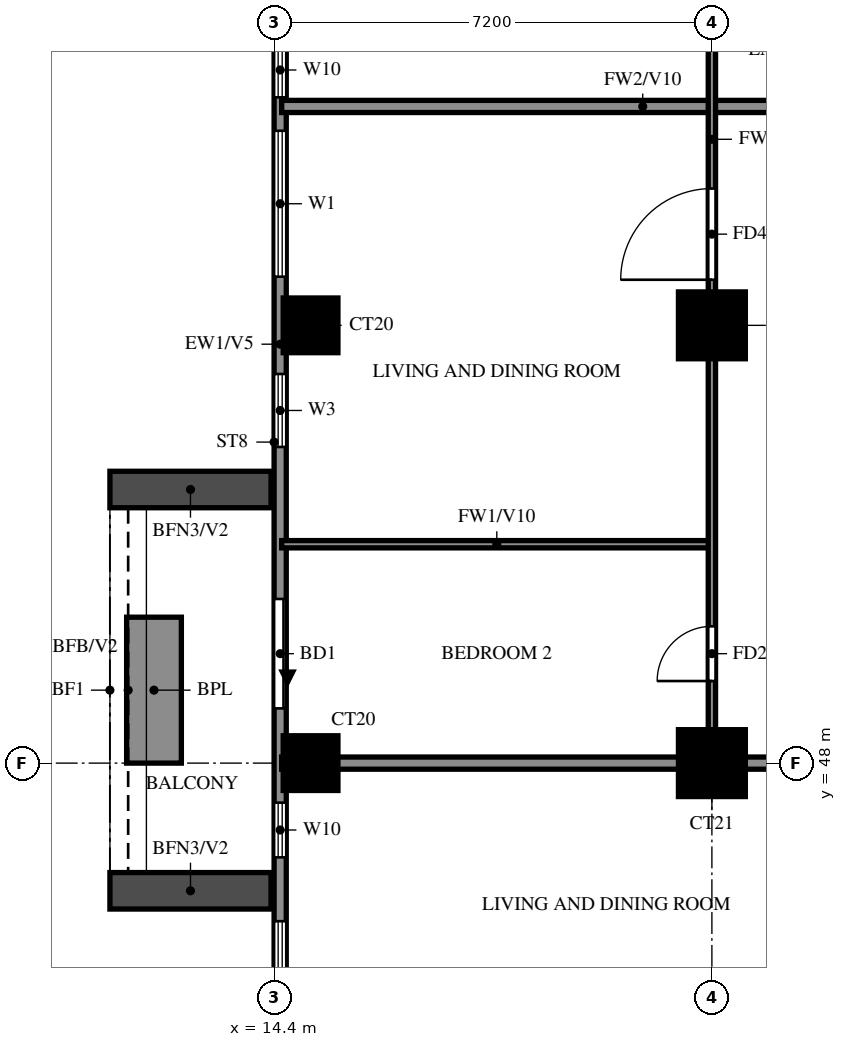
"""IFC4 building model, lengths in metres.
Left out: names, types, materials, properties, quantities, classifications, styles, units other than length and angle.
Written with IfcOpenShell. Run it as: python <this file> out.ifc"""

import sys

from ifc_helpers import new_model, si_unit, direction, frame, frame_2d, origin, origin_2d, place, context, subcontext, project, spatial, rectangle, extrude, source, transform, mapped, element, fill, save


model = new_model("IFC4")
c1 = context("Model", 3, precision=1e-05, world=origin(), true_north=direction((0.0, 1.0)))
c2 = subcontext(c1, "Body", "Model", "MODEL_VIEW")
j1 = project(units=[si_unit("LENGTHUNIT", "METRE"), si_unit("PLANEANGLEUNIT", "RADIAN")], contexts=[c1])
p1 = place(None, origin())
s1 = spatial("IfcSite", under=j1, at=p1, CompositionType="ELEMENT")
p2 = place(p1, origin())
s2 = spatial("IfcBuilding", under=s1, at=p2, CompositionType="ELEMENT")
p3 = place(p2, frame((0.0, 0.0, 134.0)))
s3 = spatial("IfcBuildingStorey", under=s2, at=p3, CompositionType="ELEMENT", Elevation=134.0)
m1 = source(origin(), c2, "Body", "SweptSolid", [
    extrude(rectangle(XDim=0.9, YDim=0.9, at=origin_2d()), origin(), (0.0, 0.0, 1.0), 3.15),
])
p4 = place(p3, frame((15.0, 48.0, 0.0), z_axis=(0.0, 0.0, 1.0), x_axis=(1.0, 0.0, 0.0)))
e1 = element("IfcColumn", 1, at=p4, inside=s3, PredefinedType="COLUMN", context=c2, shape_type="MappedRepresentation", body=[
    mapped(m1, transform((0.0, 0.0, 0.0))),
])
m2 = source(origin(), c2, "Body", "SweptSolid", [
    extrude(rectangle(XDim=1.1, YDim=1.1, at=origin_2d()), origin(), (0.0, 0.0, 1.0), 3.15),
])
p5 = place(p3, frame((21.6, 48.0, 0.0), z_axis=(0.0, 0.0, 1.0), x_axis=(1.0, 0.0, 0.0)))
e2 = element("IfcColumn", 2, at=p5, inside=s3, PredefinedType="COLUMN", context=c2, shape_type="MappedRepresentation", body=[
    mapped(m2, transform((0.0, 0.0, 0.0))),
])
p6 = place(p3, frame((15.0, 55.2, 0.0), z_axis=(0.0, 0.0, 1.0), x_axis=(1.0, 0.0, 0.0)))
e3 = element("IfcColumn", 3, at=p6, inside=s3, PredefinedType="COLUMN", context=c2, shape_type="MappedRepresentation", body=[
    mapped(m1, transform((0.0, 0.0, 0.0))),
])
p7 = place(p3, frame((21.6, 55.2, 0.0), z_axis=(0.0, 0.0, 1.0), x_axis=(1.0, 0.0, 0.0)))
e4 = element("IfcColumn", 4, at=p7, inside=s3, PredefinedType="COLUMN", context=c2, shape_type="MappedRepresentation", body=[
    mapped(m2, transform((0.0, 0.0, 0.0))),
])
p8 = place(p3, frame((14.5, 76.6, 0.0), z_axis=(0.0, 0.0, 1.0), x_axis=(0.0, -1.0, 0.0)))
e5 = element("IfcWall", 5, at=p8, inside=s3, PredefinedType="SOLIDWALL", context=c2, shape_type="SweptSolid", body=[
    extrude(rectangle(XDim=33.4, YDim=0.2, at=frame_2d((16.7, 0.0))), origin(), (0.0, 0.0, 1.0), 3.15),
])
p9 = place(p8, frame((11.5, 0.0, 0.0)))
e6 = element("IfcOpeningElement", 6, at=p9, cuts=e5, PredefinedType="OPENING", context=c2, shape_type="SweptSolid", body=[
    extrude(rectangle(XDim=1.8, YDim=2.4, at=frame_2d((0.9, 1.2))), frame((0.0, 0.11, 0.0), z_axis=(0.0, -1.0, 0.0), x_axis=(1.0, 0.0, 0.0)), (0.0, 0.0, 1.0), 0.22),
])
p10 = place(p8, frame((25.9, 0.0, 0.0)))
e7 = element("IfcOpeningElement", 7, at=p10, cuts=e5, PredefinedType="OPENING", context=c2, shape_type="SweptSolid", body=[
    extrude(rectangle(XDim=1.8, YDim=2.4, at=frame_2d((0.9, 1.2))), frame((0.0, 0.11, 0.0), z_axis=(0.0, -1.0, 0.0), x_axis=(1.0, 0.0, 0.0)), (0.0, 0.0, 1.0), 0.22),
])
p11 = place(p8, frame((29.25, 0.0, 0.6)))
e8 = element("IfcOpeningElement", 8, at=p11, cuts=e5, PredefinedType="OPENING", context=c2, shape_type="SweptSolid", body=[
    extrude(rectangle(XDim=0.9, YDim=2.4, at=frame_2d((0.45, 1.2))), frame((0.0, 0.11, 0.0), z_axis=(0.0, -1.0, 0.0), x_axis=(1.0, 0.0, 0.0)), (0.0, 0.0, 1.0), 0.22),
])
p12 = place(p8, frame((31.2, 0.0, 0.6)))
e9 = element("IfcOpeningElement", 9, at=p12, cuts=e5, PredefinedType="OPENING", context=c2, shape_type="SweptSolid", body=[
    extrude(rectangle(XDim=1.8, YDim=2.4, at=frame_2d((0.9, 1.2))), frame((0.0, 0.11, 0.0), z_axis=(0.0, -1.0, 0.0), x_axis=(1.0, 0.0, 0.0)), (0.0, 0.0, 1.0), 0.22),
])
p13 = place(p8, frame((18.2, 0.0, 0.6)))
e10 = element("IfcOpeningElement", 10, at=p13, cuts=e5, PredefinedType="OPENING", context=c2, shape_type="SweptSolid", body=[
    extrude(rectangle(XDim=2.4, YDim=2.4, at=frame_2d((1.2, 1.2))), frame((0.0, 0.11, 0.0), z_axis=(0.0, -1.0, 0.0), x_axis=(1.0, 0.0, 0.0)), (0.0, 0.0, 1.0), 0.22),
])
p14 = place(p8, frame((22.2, 0.0, 0.6)))
e11 = element("IfcOpeningElement", 11, at=p14, cuts=e5, PredefinedType="OPENING", context=c2, shape_type="SweptSolid", body=[
    extrude(rectangle(XDim=1.2, YDim=2.4, at=frame_2d((0.6, 1.2))), frame((0.0, 0.11, 0.0), z_axis=(0.0, -1.0, 0.0), x_axis=(1.0, 0.0, 0.0)), (0.0, 0.0, 1.0), 0.22),
])
p15 = place(p8, frame((14.85, 0.0, 0.6)))
e12 = element("IfcOpeningElement", 12, at=p15, cuts=e5, PredefinedType="OPENING", context=c2, shape_type="SweptSolid", body=[
    extrude(rectangle(XDim=0.9, YDim=2.4, at=frame_2d((0.45, 1.2))), frame((0.0, 0.11, 0.0), z_axis=(0.0, -1.0, 0.0), x_axis=(1.0, 0.0, 0.0)), (0.0, 0.0, 1.0), 0.22),
])
p16 = place(p8, frame((16.75, 0.0, 0.6)))
e13 = element("IfcOpeningElement", 13, at=p16, cuts=e5, PredefinedType="OPENING", context=c2, shape_type="SweptSolid", body=[
    extrude(rectangle(XDim=0.9, YDim=2.4, at=frame_2d((0.45, 1.2))), frame((0.0, 0.11, 0.0), z_axis=(0.0, -1.0, 0.0), x_axis=(1.0, 0.0, 0.0)), (0.0, 0.0, 1.0), 0.22),
])
p17 = place(p8, frame((7.8, 0.0, 0.6)))
e14 = element("IfcOpeningElement", 14, at=p17, cuts=e5, PredefinedType="OPENING", context=c2, shape_type="SweptSolid", body=[
    extrude(rectangle(XDim=1.2, YDim=2.4, at=frame_2d((0.6, 1.2))), frame((0.0, 0.11, 0.0), z_axis=(0.0, -1.0, 0.0), x_axis=(1.0, 0.0, 0.0)), (0.0, 0.0, 1.0), 0.22),
])
p18 = place(p8, frame((10.15, 0.0, 0.6)))
e15 = element("IfcOpeningElement", 15, at=p18, cuts=e5, PredefinedType="OPENING", context=c2, shape_type="SweptSolid", body=[
    extrude(rectangle(XDim=0.9, YDim=2.4, at=frame_2d((0.45, 1.2))), frame((0.0, 0.11, 0.0), z_axis=(0.0, -1.0, 0.0), x_axis=(1.0, 0.0, 0.0)), (0.0, 0.0, 1.0), 0.22),
])
p19 = place(p8, frame((4.55, 0.0, 1.5)))
e16 = element("IfcOpeningElement", 16, at=p19, cuts=e5, PredefinedType="OPENING", context=c2, shape_type="SweptSolid", body=[
    extrude(rectangle(XDim=0.9, YDim=0.9, at=frame_2d((0.45, 0.45))), frame((0.0, 0.11, 0.0), z_axis=(0.0, -1.0, 0.0), x_axis=(1.0, 0.0, 0.0)), (0.0, 0.0, 1.0), 0.22),
])
p20 = place(p8, frame((0.6, 0.0, 0.6)))
e17 = element("IfcOpeningElement", 17, at=p20, cuts=e5, PredefinedType="OPENING", context=c2, shape_type="SweptSolid", body=[
    extrude(rectangle(XDim=2.4, YDim=2.4, at=frame_2d((1.2, 1.2))), frame((0.0, 0.11, 0.0), z_axis=(0.0, -1.0, 0.0), x_axis=(1.0, 0.0, 0.0)), (0.0, 0.0, 1.0), 0.22),
])
for number, where, z_axis, x_axis in (
    (18, (14.35, 52.5, 0.0), (0.0, 0.0, 1.0), (-1.0, 0.0, 0.0)),
    (19, (14.35, 45.9, 0.0), (0.0, 0.0, 1.0), (-1.0, 0.0, 0.0)),
):
    element("IfcWall", number, at=place(p3, frame(where, z_axis=z_axis, x_axis=x_axis)), inside=s3, PredefinedType="SOLIDWALL", context=c2, shape_type="SweptSolid", body=[
        extrude(rectangle(XDim=2.65, YDim=0.6, at=frame_2d((1.325, 0.0))), origin(), (0.0, 0.0, 1.0), 2.8),
    ])
p21 = place(p3, frame((12.425, 50.4, 0.0), z_axis=(0.0, 0.0, 1.0), x_axis=(0.0, -1.0, 0.0)))
e20 = element("IfcWall", 20, at=p21, inside=s3, PredefinedType="SOLIDWALL", context=c2, shape_type="SweptSolid", body=[
    extrude(rectangle(XDim=2.4, YDim=0.9, at=frame_2d((1.2, 0.0))), origin(), (0.0, 0.0, 1.0), 0.9),
])
p22 = place(p3, frame((14.525, 48.0, 0.0), z_axis=(0.0, 0.0, 1.0), x_axis=(1.0, 0.0, 0.0)))
e21 = element("IfcWall", 21, at=p22, inside=s3, PredefinedType="SOLIDWALL", context=c2, shape_type="SweptSolid", body=[
    extrude(rectangle(XDim=19.075, YDim=0.2, at=frame_2d((9.538, 0.0))), origin(), (0.0, 0.0, 1.0), 3.15),
])
p23 = place(p3, frame((14.525, 58.8, 0.0), z_axis=(0.0, 0.0, 1.0), x_axis=(1.0, 0.0, 0.0)))
e22 = element("IfcWall", 22, at=p23, inside=s3, PredefinedType="SOLIDWALL", context=c2, shape_type="SweptSolid", body=[
    extrude(rectangle(XDim=11.875, YDim=0.2, at=frame_2d((5.938, 0.0))), origin(), (0.0, 0.0, 1.0), 2.25),
])
p24 = place(p3, frame((14.525, 51.6, 0.0), z_axis=(0.0, 0.0, 1.0), x_axis=(1.0, 0.0, 0.0)))
e23 = element("IfcWall", 23, at=p24, inside=s3, PredefinedType="PARTITIONING", context=c2, shape_type="SweptSolid", body=[
    extrude(rectangle(XDim=7.075, YDim=0.12, at=frame_2d((3.538, 0.0))), origin(), (0.0, 0.0, 1.0), 2.25),
])
p25 = place(p3, frame((21.6, 48.0, 0.0), z_axis=(0.0, 0.0, 1.0), x_axis=(0.0, 1.0, 0.0)))
e24 = element("IfcWall", 24, at=p25, inside=s3, PredefinedType="PARTITIONING", context=c2, shape_type="SweptSolid", body=[
    extrude(rectangle(XDim=21.6, YDim=0.12, at=frame_2d((10.8, 0.0))), origin(), (0.0, 0.0, 1.0), 3.15),
])
p26 = place(p25, frame((1.35, 0.0, 0.0)))
e25 = element("IfcOpeningElement", 25, at=p26, cuts=e24, PredefinedType="OPENING", context=c2, shape_type="SweptSolid", body=[
    extrude(rectangle(XDim=0.9, YDim=2.1, at=frame_2d((0.45, 1.05))), frame((0.0, 0.07, 0.0), z_axis=(0.0, -1.0, 0.0), x_axis=(1.0, 0.0, 0.0)), (0.0, 0.0, 1.0), 0.14),
])
p27 = place(p25, frame((7.95, 0.0, 0.0)))
e26 = element("IfcOpeningElement", 26, at=p27, cuts=e24, PredefinedType="OPENING", context=c2, shape_type="SweptSolid", body=[
    extrude(rectangle(XDim=1.5, YDim=2.1, at=frame_2d((0.75, 1.05))), frame((0.0, 0.07, 0.0), z_axis=(0.0, -1.0, 0.0), x_axis=(1.0, 0.0, 0.0)), (0.0, 0.0, 1.0), 0.14),
])
p28 = place(p25, frame((12.15, 0.0, 0.0)))
e27 = element("IfcOpeningElement", 27, at=p28, cuts=e24, PredefinedType="OPENING", context=c2, shape_type="SweptSolid", body=[
    extrude(rectangle(XDim=0.9, YDim=2.1, at=frame_2d((0.45, 1.05))), frame((0.0, 0.07, 0.0), z_axis=(0.0, -1.0, 0.0), x_axis=(1.0, 0.0, 0.0)), (0.0, 0.0, 1.0), 0.14),
])
p29 = place(p25, frame((17.55, 0.0, 0.0)))
e28 = element("IfcOpeningElement", 28, at=p29, cuts=e24, PredefinedType="OPENING", context=c2, shape_type="SweptSolid", body=[
    extrude(rectangle(XDim=0.9, YDim=2.1, at=frame_2d((0.45, 1.05))), frame((0.0, 0.07, 0.0), z_axis=(0.0, -1.0, 0.0), x_axis=(1.0, 0.0, 0.0)), (0.0, 0.0, 1.0), 0.14),
])
p30 = place(p10, origin())
e29 = element("IfcDoor", 29, at=p30, inside=s3, OperationType="DOUBLE_DOOR_SLIDING", PredefinedType="DOOR", context=c2, shape_type="SweptSolid", body=[
    extrude(rectangle(XDim=1.8, YDim=2.4, at=frame_2d((0.9, 1.2))), frame((0.0, 0.025, 0.0), z_axis=(0.0, -1.0, 0.0), x_axis=(1.0, 0.0, 0.0)), (0.0, 0.0, 1.0), 0.05),
])
fill(e7, e29)
p31 = place(p11, origin())
e30 = element("IfcWindow", 30, at=p31, inside=s3, PartitioningType="SINGLE_PANEL", PredefinedType="WINDOW", context=c2, shape_type="SweptSolid", body=[
    extrude(rectangle(XDim=0.9, YDim=2.4, at=frame_2d((0.45, 1.2))), frame((0.0, 0.03, 0.0), z_axis=(0.0, -1.0, 0.0), x_axis=(1.0, 0.0, 0.0)), (0.0, 0.0, 1.0), 0.06),
])
fill(e8, e30)
p32 = place(p12, origin())
e31 = element("IfcWindow", 31, at=p32, inside=s3, PartitioningType="DOUBLE_PANEL_VERTICAL", PredefinedType="WINDOW", context=c2, shape_type="SweptSolid", body=[
    extrude(rectangle(XDim=1.8, YDim=2.4, at=frame_2d((0.9, 1.2))), frame((0.0, 0.03, 0.0), z_axis=(0.0, -1.0, 0.0), x_axis=(1.0, 0.0, 0.0)), (0.0, 0.0, 1.0), 0.06),
])
fill(e9, e31)
p33 = place(p13, origin())
e32 = element("IfcWindow", 32, at=p33, inside=s3, PartitioningType="DOUBLE_PANEL_VERTICAL", PredefinedType="WINDOW", context=c2, shape_type="SweptSolid", body=[
    extrude(rectangle(XDim=2.4, YDim=2.4, at=frame_2d((1.2, 1.2))), frame((0.0, 0.03, 0.0), z_axis=(0.0, -1.0, 0.0), x_axis=(1.0, 0.0, 0.0)), (0.0, 0.0, 1.0), 0.06),
])
fill(e10, e32)
p34 = place(p14, origin())
e33 = element("IfcWindow", 33, at=p34, inside=s3, PartitioningType="SINGLE_PANEL", PredefinedType="WINDOW", context=c2, shape_type="SweptSolid", body=[
    extrude(rectangle(XDim=1.2, YDim=2.4, at=frame_2d((0.6, 1.2))), frame((0.0, 0.03, 0.0), z_axis=(0.0, -1.0, 0.0), x_axis=(1.0, 0.0, 0.0)), (0.0, 0.0, 1.0), 0.06),
])
fill(e11, e33)
p35 = place(p16, origin())
e34 = element("IfcWindow", 34, at=p35, inside=s3, PartitioningType="SINGLE_PANEL", PredefinedType="WINDOW", context=c2, shape_type="SweptSolid", body=[
    extrude(rectangle(XDim=0.9, YDim=2.4, at=frame_2d((0.45, 1.2))), frame((0.0, 0.03, 0.0), z_axis=(0.0, -1.0, 0.0), x_axis=(1.0, 0.0, 0.0)), (0.0, 0.0, 1.0), 0.06),
])
fill(e13, e34)
p36 = place(p26, origin())
e35 = element("IfcDoor", 35, at=p36, inside=s3, OperationType="SINGLE_SWING_RIGHT", PredefinedType="DOOR", context=c2, shape_type="SweptSolid", body=[
    extrude(rectangle(XDim=0.9, YDim=2.1, at=frame_2d((0.45, 1.05))), frame((0.0, 0.025, 0.0), z_axis=(0.0, -1.0, 0.0), x_axis=(1.0, 0.0, 0.0)), (0.0, 0.0, 1.0), 0.05),
])
fill(e25, e35)
p37 = place(p27, origin())
e36 = element("IfcDoor", 36, at=p37, inside=s3, OperationType="SINGLE_SWING_RIGHT", PredefinedType="DOOR", context=c2, shape_type="SweptSolid", body=[
    extrude(rectangle(XDim=1.5, YDim=2.1, at=frame_2d((0.75, 1.05))), frame((0.0, 0.025, 0.0), z_axis=(0.0, -1.0, 0.0), x_axis=(1.0, 0.0, 0.0)), (0.0, 0.0, 1.0), 0.05),
])
fill(e26, e36)
save(model, sys.argv[1])
